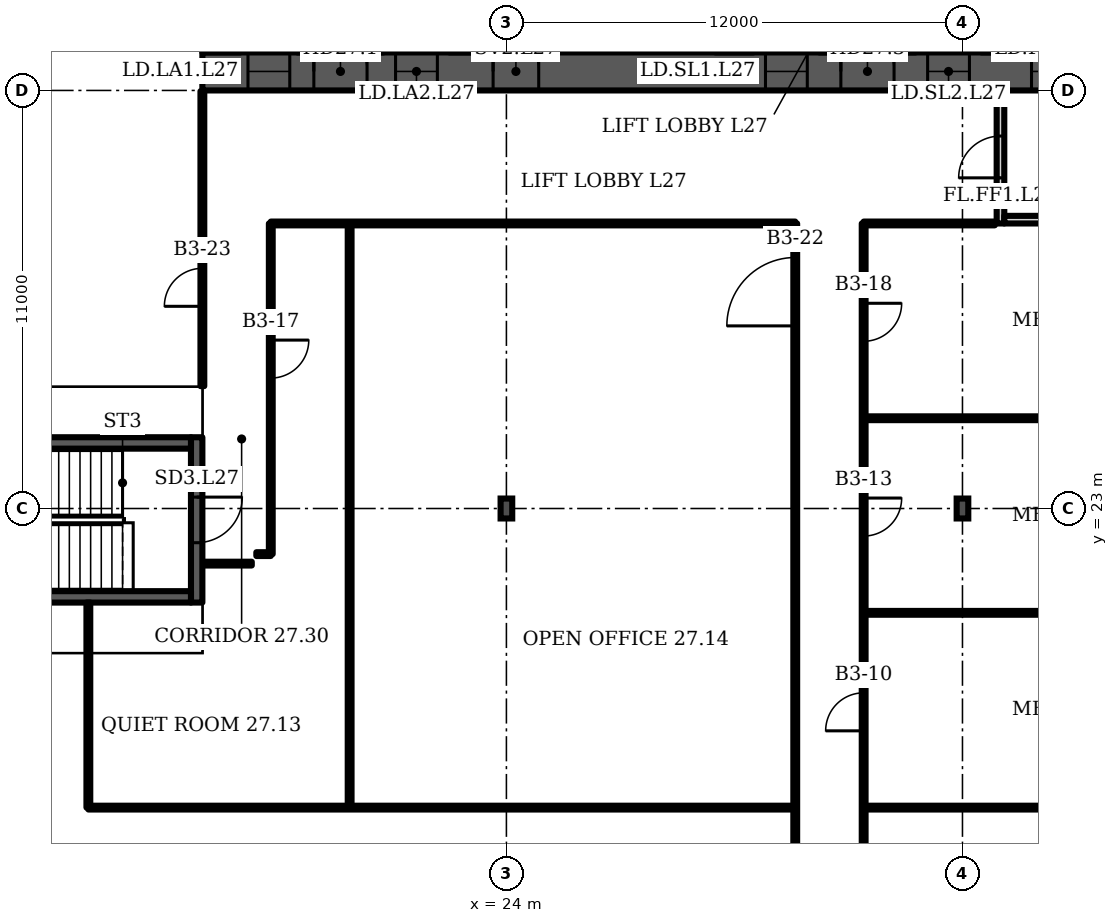
"""IFC4 building model, lengths in metres.
Left out: names, types, materials, properties, quantities, classifications, styles, units other than length and angle.
Written with IfcOpenShell. Run it as: python <this file> out.ifc"""

import sys

from ifc_helpers import new_model, si_unit, direction, frame, frame_2d, origin, origin_2d, place, context, subcontext, project, spatial, rectangle, i_section, extrude, element, fill, save


model = new_model("IFC4")
c1 = context("Model", 3, precision=1e-05, world=origin(), true_north=direction((0.0, 1.0)))
c2 = subcontext(c1, "Body", "Model", "MODEL_VIEW")
j1 = project(units=[si_unit("LENGTHUNIT", "METRE"), si_unit("PLANEANGLEUNIT", "RADIAN")], contexts=[c1])
p1 = place(None, origin())
s1 = spatial("IfcSite", under=j1, at=p1, CompositionType="ELEMENT")
p2 = place(p1, origin())
s2 = spatial("IfcBuilding", under=s1, at=p2, CompositionType="ELEMENT")
p3 = place(p2, frame((0.0, 0.0, 118.3)))
s3 = spatial("IfcBuildingStorey", under=s2, at=p3, CompositionType="ELEMENT", Elevation=118.3)
p4 = place(p3, frame((16.0, 34.5, 0.0), z_axis=(0.0, 0.0, 1.0), x_axis=(1.0, 0.0, 0.0)))
e1 = element("IfcWall", 1, at=p4, inside=s3, PredefinedType="SHEAR", context=c2, shape_type="SweptSolid", body=[
    extrude(rectangle(XDim=49.0, YDim=1.0, at=frame_2d((24.5, 0.0))), origin(), (0.0, 0.0, 1.0), 3.6),
])
p5 = place(p4, frame((1.2, 0.0, 0.0)))
e2 = element("IfcOpeningElement", 2, at=p5, cuts=e1, PredefinedType="OPENING", context=c2, shape_type="SweptSolid", body=[
    extrude(rectangle(XDim=1.1, YDim=2.1, at=frame_2d((0.55, 1.05))), frame((0.0, 0.51, 0.0), z_axis=(0.0, -1.0, 0.0), x_axis=(1.0, 0.0, 0.0)), (0.0, 0.0, 1.0), 1.02),
])
p6 = place(p4, frame((5.083, 0.0, 0.0)))
e3 = element("IfcOpeningElement", 3, at=p6, cuts=e1, PredefinedType="OPENING", context=c2, shape_type="SweptSolid", body=[
    extrude(rectangle(XDim=1.1, YDim=2.1, at=frame_2d((0.55, 1.05))), frame((0.0, 0.51, 0.0), z_axis=(0.0, -1.0, 0.0), x_axis=(1.0, 0.0, 0.0)), (0.0, 0.0, 1.0), 1.02),
])
p7 = place(p4, frame((2.933, 0.0, 0.0)))
e4 = element("IfcOpeningElement", 4, at=p7, cuts=e1, PredefinedType="OPENING", context=c2, shape_type="SweptSolid", body=[
    extrude(rectangle(XDim=1.4, YDim=2.1, at=frame_2d((0.7, 1.05))), frame((0.0, 0.51, 0.0), z_axis=(0.0, -1.0, 0.0), x_axis=(1.0, 0.0, 0.0)), (0.0, 0.0, 1.0), 1.02),
])
p8 = place(p4, frame((7.65, 0.0, 0.0)))
e5 = element("IfcOpeningElement", 5, at=p8, cuts=e1, PredefinedType="OPENING", context=c2, shape_type="SweptSolid", body=[
    extrude(rectangle(XDim=1.2, YDim=2.1, at=frame_2d((0.6, 1.05))), frame((0.0, 0.51, 0.0), z_axis=(0.0, -1.0, 0.0), x_axis=(1.0, 0.0, 0.0)), (0.0, 0.0, 1.0), 1.02),
])
p9 = place(p4, frame((14.817, 0.0, 0.0)))
e6 = element("IfcOpeningElement", 6, at=p9, cuts=e1, PredefinedType="OPENING", context=c2, shape_type="SweptSolid", body=[
    extrude(rectangle(XDim=1.1, YDim=2.1, at=frame_2d((0.55, 1.05))), frame((0.0, 0.51, 0.0), z_axis=(0.0, -1.0, 0.0), x_axis=(1.0, 0.0, 0.0)), (0.0, 0.0, 1.0), 1.02),
])
p10 = place(p4, frame((19.083, 0.0, 0.0)))
e7 = element("IfcOpeningElement", 7, at=p10, cuts=e1, PredefinedType="OPENING", context=c2, shape_type="SweptSolid", body=[
    extrude(rectangle(XDim=1.1, YDim=2.1, at=frame_2d((0.55, 1.05))), frame((0.0, 0.51, 0.0), z_axis=(0.0, -1.0, 0.0), x_axis=(1.0, 0.0, 0.0)), (0.0, 0.0, 1.0), 1.02),
])
p11 = place(p4, frame((16.8, 0.0, 0.0)))
e8 = element("IfcOpeningElement", 8, at=p11, cuts=e1, PredefinedType="OPENING", context=c2, shape_type="SweptSolid", body=[
    extrude(rectangle(XDim=1.4, YDim=2.1, at=frame_2d((0.7, 1.05))), frame((0.0, 0.51, 0.0), z_axis=(0.0, -1.0, 0.0), x_axis=(1.0, 0.0, 0.0)), (0.0, 0.0, 1.0), 1.02),
])
p12 = place(p4, frame((21.817, 0.0, 0.0)))
e9 = element("IfcOpeningElement", 9, at=p12, cuts=e1, PredefinedType="OPENING", context=c2, shape_type="SweptSolid", body=[
    extrude(rectangle(XDim=1.1, YDim=2.1, at=frame_2d((0.55, 1.05))), frame((0.0, 0.51, 0.0), z_axis=(0.0, -1.0, 0.0), x_axis=(1.0, 0.0, 0.0)), (0.0, 0.0, 1.0), 1.02),
])
p13 = place(p4, frame((26.083, 0.0, 0.0)))
e10 = element("IfcOpeningElement", 10, at=p13, cuts=e1, PredefinedType="OPENING", context=c2, shape_type="SweptSolid", body=[
    extrude(rectangle(XDim=1.1, YDim=2.1, at=frame_2d((0.55, 1.05))), frame((0.0, 0.51, 0.0), z_axis=(0.0, -1.0, 0.0), x_axis=(1.0, 0.0, 0.0)), (0.0, 0.0, 1.0), 1.02),
])
p14 = place(p4, frame((33.15, 0.0, 0.0)))
e11 = element("IfcOpeningElement", 11, at=p14, cuts=e1, PredefinedType="OPENING", context=c2, shape_type="SweptSolid", body=[
    extrude(rectangle(XDim=1.2, YDim=2.1, at=frame_2d((0.6, 1.05))), frame((0.0, 0.51, 0.0), z_axis=(0.0, -1.0, 0.0), x_axis=(1.0, 0.0, 0.0)), (0.0, 0.0, 1.0), 1.02),
])
p15 = place(p4, frame((37.8, 0.0, 0.0)))
e12 = element("IfcOpeningElement", 12, at=p15, cuts=e1, PredefinedType="OPENING", context=c2, shape_type="SweptSolid", body=[
    extrude(rectangle(XDim=1.4, YDim=2.1, at=frame_2d((0.7, 1.05))), frame((0.0, 0.51, 0.0), z_axis=(0.0, -1.0, 0.0), x_axis=(1.0, 0.0, 0.0)), (0.0, 0.0, 1.0), 1.02),
])
p16 = place(p4, frame((42.817, 0.0, 0.0)))
e13 = element("IfcOpeningElement", 13, at=p16, cuts=e1, PredefinedType="OPENING", context=c2, shape_type="SweptSolid", body=[
    extrude(rectangle(XDim=1.1, YDim=2.1, at=frame_2d((0.55, 1.05))), frame((0.0, 0.51, 0.0), z_axis=(0.0, -1.0, 0.0), x_axis=(1.0, 0.0, 0.0)), (0.0, 0.0, 1.0), 1.02),
])
p17 = place(p4, frame((46.7, 0.0, 0.0)))
e14 = element("IfcOpeningElement", 14, at=p17, cuts=e1, PredefinedType="OPENING", context=c2, shape_type="SweptSolid", body=[
    extrude(rectangle(XDim=1.1, YDim=2.1, at=frame_2d((0.55, 1.05))), frame((0.0, 0.51, 0.0), z_axis=(0.0, -1.0, 0.0), x_axis=(1.0, 0.0, 0.0)), (0.0, 0.0, 1.0), 1.02),
])
p18 = place(p4, frame((44.667, 0.0, 0.0)))
e15 = element("IfcOpeningElement", 15, at=p18, cuts=e1, PredefinedType="OPENING", context=c2, shape_type="SweptSolid", body=[
    extrude(rectangle(XDim=1.4, YDim=2.1, at=frame_2d((0.7, 1.05))), frame((0.0, 0.51, 0.0), z_axis=(0.0, -1.0, 0.0), x_axis=(1.0, 0.0, 0.0)), (0.0, 0.0, 1.0), 1.02),
])
for number, where, z_axis, x_axis in (
    (16, (24.0, 23.0, 0.0), (0.0, 0.0, 1.0), (1.0, 0.0, 0.0)),
    (17, (36.0, 23.0, 0.0), (0.0, 0.0, 1.0), (1.0, 0.0, 0.0)),
):
    element("IfcColumn", number, at=place(p3, frame(where, z_axis=z_axis, x_axis=x_axis)), inside=s3, PredefinedType="COLUMN", context=c2, shape_type="SweptSolid", body=[
        extrude(i_section(OverallWidth=0.306, OverallDepth=0.524, WebThickness=0.021, FlangeThickness=0.04, FilletRadius=0.027, at=origin_2d()), origin(), (0.0, 0.0, 1.0), 3.6),
    ])
p19 = place(p3, frame((37.0, 30.5, 0.0), z_axis=(0.0, 0.0, 1.0), x_axis=(0.0, 1.0, 0.0)))
e18 = element("IfcWall", 18, at=p19, inside=s3, PredefinedType="PARTITIONING", context=c2, shape_type="SweptSolid", body=[
    extrude(rectangle(XDim=3.5, YDim=0.2, at=frame_2d((1.75, 0.0))), origin(), (0.0, 0.0, 1.0), 3.2),
])
p20 = place(p19, frame((1.2, 0.0, 0.0)))
e19 = element("IfcOpeningElement", 19, at=p20, cuts=e18, PredefinedType="OPENING", context=c2, shape_type="SweptSolid", body=[
    extrude(rectangle(XDim=1.1, YDim=2.1, at=frame_2d((0.55, 1.05))), frame((0.0, 0.11, 0.0), z_axis=(0.0, -1.0, 0.0), x_axis=(1.0, 0.0, 0.0)), (0.0, 0.0, 1.0), 0.22),
])
p21 = place(p3, frame((37.1, 30.6, 0.0), z_axis=(0.0, 0.0, 1.0), x_axis=(1.0, 0.0, 0.0)))
e20 = element("IfcWall", 20, at=p21, inside=s3, PredefinedType="PARTITIONING", context=c2, shape_type="SweptSolid", body=[
    extrude(rectangle(XDim=2.8, YDim=0.2, at=frame_2d((1.4, 0.0))), origin(), (0.0, 0.0, 1.0), 3.2),
])
p22 = place(p3, frame((15.85, 20.525, 0.0), z_axis=(0.0, 0.0, 1.0), x_axis=(0.0, 1.0, 0.0)))
e21 = element("IfcWall", 21, at=p22, inside=s3, PredefinedType="SHEAR", context=c2, shape_type="SweptSolid", body=[
    extrude(rectangle(XDim=4.35, YDim=0.3, at=frame_2d((2.175, 0.0))), origin(), (0.0, 0.0, 1.0), 3.2),
])
p23 = place(p22, frame((1.575, 0.0, 0.0)))
e22 = element("IfcOpeningElement", 22, at=p23, cuts=e21, PredefinedType="OPENING", context=c2, shape_type="SweptSolid", body=[
    extrude(rectangle(XDim=1.2, YDim=2.1, at=frame_2d((0.6, 1.05))), frame((0.0, 0.16, 0.0), z_axis=(0.0, -1.0, 0.0), x_axis=(1.0, 0.0, 0.0)), (0.0, 0.0, 1.0), 0.32),
])
p24 = place(p3, frame((13.0, 15.13, 0.0), z_axis=(0.0, 0.0, 1.0), x_axis=(0.0, 1.0, 0.0)))
e23 = element("IfcWall", 23, at=p24, inside=s3, PredefinedType="PARTITIONING", context=c2, shape_type="SweptSolid", body=[
    extrude(rectangle(XDim=5.395, YDim=0.1, at=frame_2d((2.698, 0.0))), origin(), (0.0, 0.0, 1.0), 3.2),
])
p25 = place(p3, frame((13.0, 15.13, 0.0), z_axis=(0.0, 0.0, 1.0), x_axis=(1.0, 0.0, 0.0)))
e24 = element("IfcWall", 24, at=p25, inside=s3, PredefinedType="PARTITIONING", context=c2, shape_type="SweptSolid", body=[
    extrude(rectangle(XDim=18.6, YDim=0.1, at=frame_2d((9.3, 0.0))), origin(), (0.0, 0.0, 1.0), 3.2),
])
p26 = place(p3, frame((16.0, 26.22, 0.0), z_axis=(0.0, 0.0, 1.0), x_axis=(0.0, 1.0, 0.0)))
e25 = element("IfcWall", 25, at=p26, inside=s3, PredefinedType="PARTITIONING", context=c2, shape_type="SweptSolid", body=[
    extrude(rectangle(XDim=7.76, YDim=0.1, at=frame_2d((3.88, 0.0))), origin(), (0.0, 0.0, 1.0), 3.2),
])
p27 = place(p26, frame((2.1, 0.0, 0.0)))
e26 = element("IfcOpeningElement", 26, at=p27, cuts=e25, PredefinedType="OPENING", context=c2, shape_type="SweptSolid", body=[
    extrude(rectangle(XDim=1.0, YDim=2.1, at=frame_2d((0.5, 1.05))), frame((0.0, 0.06, 0.0), z_axis=(0.0, -1.0, 0.0), x_axis=(1.0, 0.0, 0.0)), (0.0, 0.0, 1.0), 0.12),
])
p28 = place(p3, frame((16.02, 21.55, 0.0), z_axis=(0.0, 0.0, 1.0), x_axis=(1.0, 0.0, 0.0)))
e27 = element("IfcWall", 27, at=p28, inside=s3, PredefinedType="PARTITIONING", context=c2, shape_type="SweptSolid", body=[
    extrude(rectangle(XDim=1.28, YDim=0.1, at=frame_2d((0.64, 0.0))), origin(), (0.0, 0.0, 1.0), 3.2),
])
p29 = place(p3, frame((17.42, 21.8, 0.0), z_axis=(0.0, 0.0, 1.0), x_axis=(1.0, 0.0, 0.0)))
e28 = element("IfcWall", 28, at=p29, inside=s3, PredefinedType="PARTITIONING", context=c2, shape_type="SweptSolid", body=[
    extrude(rectangle(XDim=0.38, YDim=0.1, at=frame_2d((0.19, 0.0))), origin(), (0.0, 0.0, 1.0), 3.2),
])
p30 = place(p3, frame((17.8, 21.8, 0.0), z_axis=(0.0, 0.0, 1.0), x_axis=(0.0, 1.0, 0.0)))
e29 = element("IfcWall", 29, at=p30, inside=s3, PredefinedType="PARTITIONING", context=c2, shape_type="SweptSolid", body=[
    extrude(rectangle(XDim=8.7, YDim=0.1, at=frame_2d((4.35, 0.0))), origin(), (0.0, 0.0, 1.0), 3.2),
])
p31 = place(p30, frame((4.631, 0.0, 0.0)))
e30 = element("IfcOpeningElement", 30, at=p31, cuts=e29, PredefinedType="OPENING", context=c2, shape_type="SweptSolid", body=[
    extrude(rectangle(XDim=1.0, YDim=2.1, at=frame_2d((0.5, 1.05))), frame((0.0, 0.06, 0.0), z_axis=(0.0, -1.0, 0.0), x_axis=(1.0, 0.0, 0.0)), (0.0, 0.0, 1.0), 0.12),
])
p32 = place(p3, frame((17.8, 30.5, 0.0), z_axis=(0.0, 0.0, 1.0), x_axis=(1.0, 0.0, 0.0)))
e31 = element("IfcWall", 31, at=p32, inside=s3, PredefinedType="PARTITIONING", context=c2, shape_type="SweptSolid", body=[
    extrude(rectangle(XDim=13.8, YDim=0.1, at=frame_2d((6.9, 0.0))), origin(), (0.0, 0.0, 1.0), 3.2),
])
p33 = place(p3, frame((19.875, 15.13, 0.0), z_axis=(0.0, 0.0, 1.0), x_axis=(0.0, 1.0, 0.0)))
e32 = element("IfcWall", 32, at=p33, inside=s3, PredefinedType="PARTITIONING", context=c2, shape_type="SweptSolid", body=[
    extrude(rectangle(XDim=15.37, YDim=0.1, at=frame_2d((7.685, 0.0))), origin(), (0.0, 0.0, 1.0), 3.2),
])
p34 = place(p3, frame((31.6, 0.56, 0.0), z_axis=(0.0, 0.0, 1.0), x_axis=(0.0, 1.0, 0.0)))
e33 = element("IfcWall", 33, at=p34, inside=s3, PredefinedType="PARTITIONING", context=c2, shape_type="SweptSolid", body=[
    extrude(rectangle(XDim=29.94, YDim=0.1, at=frame_2d((14.97, 0.0))), origin(), (0.0, 0.0, 1.0), 3.2),
])
p35 = place(p34, frame((6.75, 0.0, 0.0)))
e34 = element("IfcOpeningElement", 34, at=p35, cuts=e33, PredefinedType="OPENING", context=c2, shape_type="SweptSolid", body=[
    extrude(rectangle(XDim=1.0, YDim=2.1, at=frame_2d((0.5, 1.05))), frame((0.0, 0.06, 0.0), z_axis=(0.0, -1.0, 0.0), x_axis=(1.0, 0.0, 0.0)), (0.0, 0.0, 1.0), 0.12),
])
p36 = place(p34, frame((27.245, 0.0, 0.0)))
e35 = element("IfcOpeningElement", 35, at=p36, cuts=e33, PredefinedType="OPENING", context=c2, shape_type="SweptSolid", body=[
    extrude(rectangle(XDim=1.8, YDim=2.1, at=frame_2d((0.9, 1.05))), frame((0.0, 0.06, 0.0), z_axis=(0.0, -1.0, 0.0), x_axis=(1.0, 0.0, 0.0)), (0.0, 0.0, 1.0), 0.12),
])
p37 = place(p3, frame((33.4, 10.22, 0.0), z_axis=(0.0, 0.0, 1.0), x_axis=(0.0, 1.0, 0.0)))
e36 = element("IfcWall", 36, at=p37, inside=s3, PredefinedType="PARTITIONING", context=c2, shape_type="SweptSolid", body=[
    extrude(rectangle(XDim=20.28, YDim=0.1, at=frame_2d((10.14, 0.0))), origin(), (0.0, 0.0, 1.0), 3.2),
])
p38 = place(p37, frame((6.93, 0.0, 0.0)))
e37 = element("IfcOpeningElement", 37, at=p38, cuts=e36, PredefinedType="OPENING", context=c2, shape_type="SweptSolid", body=[
    extrude(rectangle(XDim=1.0, YDim=2.1, at=frame_2d((0.5, 1.05))), frame((0.0, 0.06, 0.0), z_axis=(0.0, -1.0, 0.0), x_axis=(1.0, 0.0, 0.0)), (0.0, 0.0, 1.0), 0.12),
])
p39 = place(p37, frame((12.055, 0.0, 0.0)))
e38 = element("IfcOpeningElement", 38, at=p39, cuts=e36, PredefinedType="OPENING", context=c2, shape_type="SweptSolid", body=[
    extrude(rectangle(XDim=1.0, YDim=2.1, at=frame_2d((0.5, 1.05))), frame((0.0, 0.06, 0.0), z_axis=(0.0, -1.0, 0.0), x_axis=(1.0, 0.0, 0.0)), (0.0, 0.0, 1.0), 0.12),
])
p40 = place(p37, frame((17.18, 0.0, 0.0)))
e39 = element("IfcOpeningElement", 39, at=p40, cuts=e36, PredefinedType="OPENING", context=c2, shape_type="SweptSolid", body=[
    extrude(rectangle(XDim=1.0, YDim=2.1, at=frame_2d((0.5, 1.05))), frame((0.0, 0.06, 0.0), z_axis=(0.0, -1.0, 0.0), x_axis=(1.0, 0.0, 0.0)), (0.0, 0.0, 1.0), 0.12),
])
p41 = place(p3, frame((33.4, 15.13, 0.0), z_axis=(0.0, 0.0, 1.0), x_axis=(1.0, 0.0, 0.0)))
e40 = element("IfcWall", 40, at=p41, inside=s3, PredefinedType="PARTITIONING", context=c2, shape_type="SweptSolid", body=[
    extrude(rectangle(XDim=24.2, YDim=0.1, at=frame_2d((12.1, 0.0))), origin(), (0.0, 0.0, 1.0), 3.2),
])
for number, where, z_axis, x_axis in (
    (41, (33.4, 20.255, 0.0), (0.0, 0.0, 1.0), (1.0, 0.0, 0.0)),
    (42, (33.4, 25.375, 0.0), (0.0, 0.0, 1.0), (1.0, 0.0, 0.0)),
):
    element("IfcWall", number, at=place(p3, frame(where, z_axis=z_axis, x_axis=x_axis)), inside=s3, PredefinedType="PARTITIONING", context=c2, shape_type="SweptSolid", body=[
        extrude(rectangle(XDim=13.975, YDim=0.1, at=frame_2d((6.988, 0.0))), origin(), (0.0, 0.0, 1.0), 3.2),
    ])
p42 = place(p3, frame((33.4, 30.5, 0.0), z_axis=(0.0, 0.0, 1.0), x_axis=(1.0, 0.0, 0.0)))
e43 = element("IfcWall", 43, at=p42, inside=s3, PredefinedType="PARTITIONING", context=c2, shape_type="SweptSolid", body=[
    extrude(rectangle(XDim=3.45, YDim=0.1, at=frame_2d((1.725, 0.0))), origin(), (0.0, 0.0, 1.0), 3.2),
])
for number, where, z_axis, x_axis in (
    (44, (8.2, 20.675, 0.0), (0.0, 0.0, 1.0), (1.0, 0.0, 0.0)),
    (45, (8.2, 24.725, 0.0), (0.0, 0.0, 1.0), (1.0, 0.0, 0.0)),
):
    element("IfcWall", number, at=place(p3, frame(where, z_axis=z_axis, x_axis=x_axis)), inside=s3, PredefinedType="SHEAR", context=c2, shape_type="SweptSolid", body=[
        extrude(rectangle(XDim=7.5, YDim=0.3, at=frame_2d((3.75, 0.0))), origin(), (0.0, 0.0, 1.0), 3.2),
    ])
p43 = place(p5, origin())
e46 = element("IfcDoor", 46, at=p43, inside=s3, OperationType="DOUBLE_DOOR_SLIDING", PredefinedType="DOOR", context=c2, shape_type="SweptSolid", body=[
    extrude(rectangle(XDim=1.1, YDim=2.1, at=frame_2d((0.55, 1.05))), frame((0.0, 0.025, 0.0), z_axis=(0.0, -1.0, 0.0), x_axis=(1.0, 0.0, 0.0)), (0.0, 0.0, 1.0), 0.05),
])
fill(e2, e46)
p44 = place(p6, origin())
e47 = element("IfcDoor", 47, at=p44, inside=s3, OperationType="DOUBLE_DOOR_SLIDING", PredefinedType="DOOR", context=c2, shape_type="SweptSolid", body=[
    extrude(rectangle(XDim=1.1, YDim=2.1, at=frame_2d((0.55, 1.05))), frame((0.0, 0.025, 0.0), z_axis=(0.0, -1.0, 0.0), x_axis=(1.0, 0.0, 0.0)), (0.0, 0.0, 1.0), 0.05),
])
fill(e3, e47)
p45 = place(p7, origin())
e48 = element("IfcDoor", 48, at=p45, inside=s3, OperationType="DOUBLE_DOOR_SINGLE_SWING", PredefinedType="DOOR", context=c2, shape_type="SweptSolid", body=[
    extrude(rectangle(XDim=1.4, YDim=2.1, at=frame_2d((0.7, 1.05))), frame((0.0, 0.025, 0.0), z_axis=(0.0, -1.0, 0.0), x_axis=(1.0, 0.0, 0.0)), (0.0, 0.0, 1.0), 0.05),
])
fill(e4, e48)
p46 = place(p8, origin())
e49 = element("IfcDoor", 49, at=p46, inside=s3, OperationType="SINGLE_SWING_LEFT", PredefinedType="DOOR", context=c2, shape_type="SweptSolid", body=[
    extrude(rectangle(XDim=1.2, YDim=2.1, at=frame_2d((0.6, 1.05))), frame((0.0, 0.025, 0.0), z_axis=(0.0, -1.0, 0.0), x_axis=(1.0, 0.0, 0.0)), (0.0, 0.0, 1.0), 0.05),
])
fill(e5, e49)
p47 = place(p9, origin())
e50 = element("IfcDoor", 50, at=p47, inside=s3, OperationType="DOUBLE_DOOR_SLIDING", PredefinedType="DOOR", context=c2, shape_type="SweptSolid", body=[
    extrude(rectangle(XDim=1.1, YDim=2.1, at=frame_2d((0.55, 1.05))), frame((0.0, 0.025, 0.0), z_axis=(0.0, -1.0, 0.0), x_axis=(1.0, 0.0, 0.0)), (0.0, 0.0, 1.0), 0.05),
])
fill(e6, e50)
p48 = place(p10, origin())
e51 = element("IfcDoor", 51, at=p48, inside=s3, OperationType="DOUBLE_DOOR_SLIDING", PredefinedType="DOOR", context=c2, shape_type="SweptSolid", body=[
    extrude(rectangle(XDim=1.1, YDim=2.1, at=frame_2d((0.55, 1.05))), frame((0.0, 0.025, 0.0), z_axis=(0.0, -1.0, 0.0), x_axis=(1.0, 0.0, 0.0)), (0.0, 0.0, 1.0), 0.05),
])
fill(e7, e51)
p49 = place(p11, origin())
e52 = element("IfcDoor", 52, at=p49, inside=s3, OperationType="DOUBLE_DOOR_SINGLE_SWING", PredefinedType="DOOR", context=c2, shape_type="SweptSolid", body=[
    extrude(rectangle(XDim=1.4, YDim=2.1, at=frame_2d((0.7, 1.05))), frame((0.0, 0.025, 0.0), z_axis=(0.0, -1.0, 0.0), x_axis=(1.0, 0.0, 0.0)), (0.0, 0.0, 1.0), 0.05),
])
fill(e8, e52)
p50 = place(p12, origin())
e53 = element("IfcDoor", 53, at=p50, inside=s3, OperationType="DOUBLE_DOOR_SLIDING", PredefinedType="DOOR", context=c2, shape_type="SweptSolid", body=[
    extrude(rectangle(XDim=1.1, YDim=2.1, at=frame_2d((0.55, 1.05))), frame((0.0, 0.025, 0.0), z_axis=(0.0, -1.0, 0.0), x_axis=(1.0, 0.0, 0.0)), (0.0, 0.0, 1.0), 0.05),
])
fill(e9, e53)
p51 = place(p20, origin())
e54 = element("IfcDoor", 54, at=p51, inside=s3, OperationType="SINGLE_SWING_LEFT", PredefinedType="DOOR", context=c2, shape_type="SweptSolid", body=[
    extrude(rectangle(XDim=1.1, YDim=2.1, at=frame_2d((0.55, 1.05))), frame((0.0, 0.025, 0.0), z_axis=(0.0, -1.0, 0.0), x_axis=(1.0, 0.0, 0.0)), (0.0, 0.0, 1.0), 0.05),
])
fill(e19, e54)
p52 = place(p23, origin())
e55 = element("IfcDoor", 55, at=p52, inside=s3, OperationType="SINGLE_SWING_RIGHT", PredefinedType="DOOR", context=c2, shape_type="SweptSolid", body=[
    extrude(rectangle(XDim=1.2, YDim=2.1, at=frame_2d((0.6, 1.05))), frame((0.0, 0.025, 0.0), z_axis=(0.0, -1.0, 0.0), x_axis=(1.0, 0.0, 0.0)), (0.0, 0.0, 1.0), 0.05),
])
fill(e22, e55)
p53 = place(p38, origin())
e56 = element("IfcDoor", 56, at=p53, inside=s3, OperationType="SINGLE_SWING_LEFT", PredefinedType="DOOR", context=c2, shape_type="SweptSolid", body=[
    extrude(rectangle(XDim=1.0, YDim=2.1, at=frame_2d((0.5, 1.05))), frame((0.0, 0.025, 0.0), z_axis=(0.0, -1.0, 0.0), x_axis=(1.0, 0.0, 0.0)), (0.0, 0.0, 1.0), 0.05),
])
fill(e37, e56)
p54 = place(p39, origin())
e57 = element("IfcDoor", 57, at=p54, inside=s3, OperationType="SINGLE_SWING_RIGHT", PredefinedType="DOOR", context=c2, shape_type="SweptSolid", body=[
    extrude(rectangle(XDim=1.0, YDim=2.1, at=frame_2d((0.5, 1.05))), frame((0.0, 0.025, 0.0), z_axis=(0.0, -1.0, 0.0), x_axis=(1.0, 0.0, 0.0)), (0.0, 0.0, 1.0), 0.05),
])
fill(e38, e57)
p55 = place(p31, origin())
e58 = element("IfcDoor", 58, at=p55, inside=s3, OperationType="SINGLE_SWING_RIGHT", PredefinedType="DOOR", context=c2, shape_type="SweptSolid", body=[
    extrude(rectangle(XDim=1.0, YDim=2.1, at=frame_2d((0.5, 1.05))), frame((0.0, 0.025, 0.0), z_axis=(0.0, -1.0, 0.0), x_axis=(1.0, 0.0, 0.0)), (0.0, 0.0, 1.0), 0.05),
])
fill(e30, e58)
p56 = place(p40, origin())
e59 = element("IfcDoor", 59, at=p56, inside=s3, OperationType="SINGLE_SWING_RIGHT", PredefinedType="DOOR", context=c2, shape_type="SweptSolid", body=[
    extrude(rectangle(XDim=1.0, YDim=2.1, at=frame_2d((0.5, 1.05))), frame((0.0, 0.025, 0.0), z_axis=(0.0, -1.0, 0.0), x_axis=(1.0, 0.0, 0.0)), (0.0, 0.0, 1.0), 0.05),
])
fill(e39, e59)
p57 = place(p36, origin())
e60 = element("IfcDoor", 60, at=p57, inside=s3, OperationType="DOUBLE_DOOR_SINGLE_SWING", PredefinedType="DOOR", context=c2, shape_type="SweptSolid", body=[
    extrude(rectangle(XDim=1.8, YDim=2.1, at=frame_2d((0.9, 1.05))), frame((0.0, 0.025, 0.0), z_axis=(0.0, -1.0, 0.0), x_axis=(1.0, 0.0, 0.0)), (0.0, 0.0, 1.0), 0.05),
])
fill(e35, e60)
p58 = place(p27, origin())
e61 = element("IfcDoor", 61, at=p58, inside=s3, OperationType="SINGLE_SWING_LEFT", PredefinedType="DOOR", context=c2, shape_type="SweptSolid", body=[
    extrude(rectangle(XDim=1.0, YDim=2.1, at=frame_2d((0.5, 1.05))), frame((0.0, 0.025, 0.0), z_axis=(0.0, -1.0, 0.0), x_axis=(1.0, 0.0, 0.0)), (0.0, 0.0, 1.0), 0.05),
])
fill(e26, e61)
save(model, sys.argv[1])
